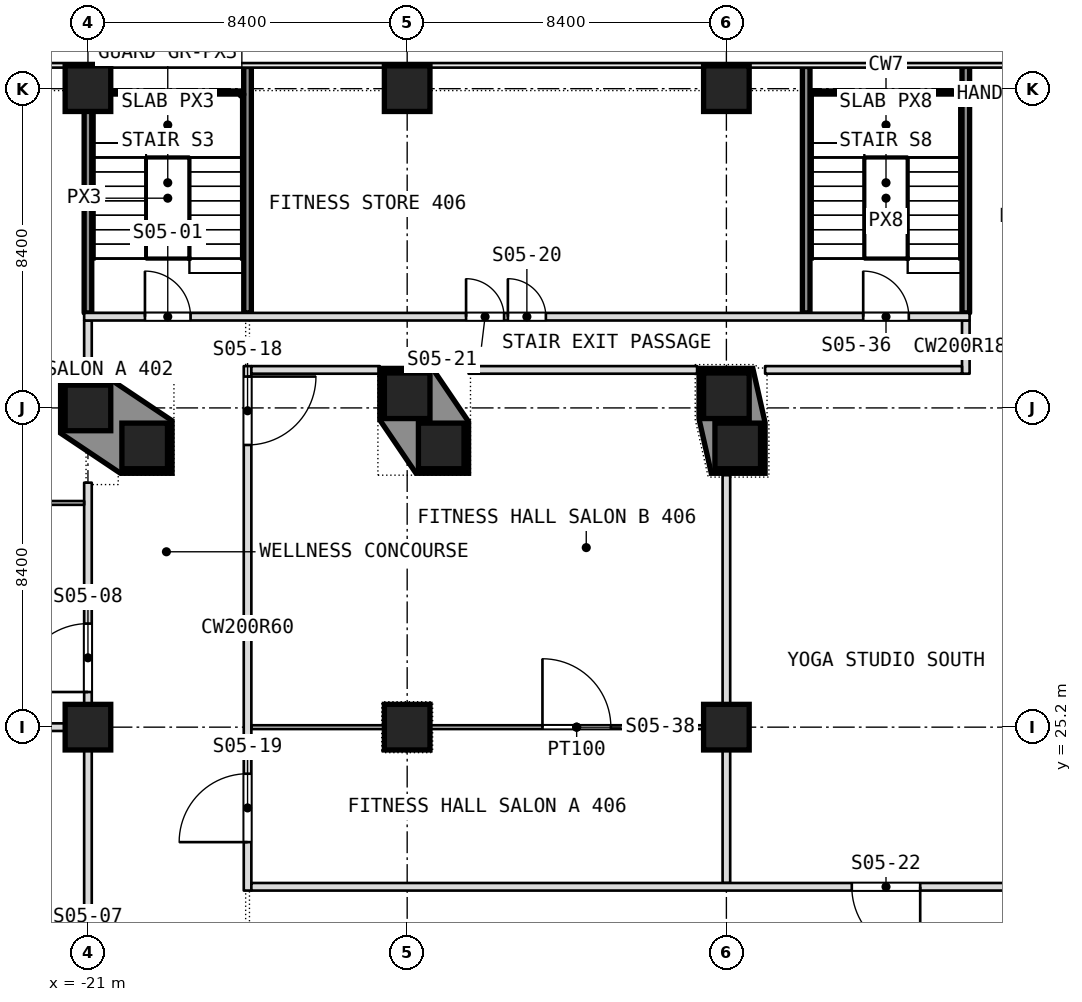
"""IFC4 building model, lengths in metres.
Left out: names, types, materials, properties, quantities, classifications, styles, units other than length and angle.
Written with IfcOpenShell. Run it as: python <this file> out.ifc"""

import sys

from ifc_helpers import new_model, si_unit, direction, frame, frame_2d, origin, origin_2d, place, context, subcontext, project, spatial, polyline, rectangle, outline, extrude, element, fill, save


model = new_model("IFC4")
c1 = context("Model", 3, precision=1e-05, world=origin(), true_north=direction((0.0, 1.0)))
c2 = subcontext(c1, "Body", "Model", "MODEL_VIEW")
j1 = project(units=[si_unit("LENGTHUNIT", "METRE"), si_unit("PLANEANGLEUNIT", "RADIAN")], contexts=[c1])
p1 = place(None, origin())
s1 = spatial("IfcSite", under=j1, at=p1, CompositionType="ELEMENT")
p2 = place(p1, origin())
s2 = spatial("IfcBuilding", under=s1, at=p2, CompositionType="ELEMENT")
p3 = place(p2, frame((0.0, 0.0, 26.0)))
s3 = spatial("IfcBuildingStorey", under=s2, at=p3, CompositionType="ELEMENT", Elevation=26.0)
for number, where, z_axis, x_axis in (
    (1, (-21.0, 25.2, 0.0), (0.0, 0.0, 1.0), (1.0, 0.0, 0.0)),
    (2, (-12.6, 25.2, 0.0), (0.0, 0.0, 1.0), (1.0, 0.0, 0.0)),
    (3, (-4.2, 25.2, 0.0), (0.0, 0.0, 1.0), (1.0, 0.0, 0.0)),
    (4, (-21.0, 33.6, 0.0), (0.0, 0.0, 1.0), (1.0, 0.0, 0.0)),
    (5, (-12.6, 33.92, 0.0), (0.0, 0.0, 1.0), (1.0, 0.0, 0.0)),
    (6, (-4.2, 33.92, 0.0), (0.0, 0.0, 1.0), (1.0, 0.0, 0.0)),
    (7, (-21.0, 42.0, 0.0), (0.0, 0.0, 1.0), (1.0, 0.0, 0.0)),
    (8, (-12.6, 42.0, 0.0), (0.0, 0.0, 1.0), (1.0, 0.0, 0.0)),
    (9, (-4.2, 42.0, 0.0), (0.0, 0.0, 1.0), (1.0, 0.0, 0.0)),
    (10, (-19.507, 32.6, 0.0), (0.0, 0.0, 1.0), (1.0, 0.0, 0.0)),
    (11, (-11.704, 32.6, 0.0), (0.0, 0.0, 1.0), (1.0, 0.0, 0.0)),
    (12, (-3.901, 32.6, 0.0), (0.0, 0.0, 1.0), (1.0, 0.0, 0.0)),
):
    element("IfcColumn", number, at=place(p3, frame(where, z_axis=z_axis, x_axis=x_axis)), inside=s3, PredefinedType="COLUMN", context=c2, shape_type="SweptSolid", body=[
        extrude(rectangle(XDim=1.2, YDim=1.2, at=origin_2d()), origin(), (0.0, 0.0, 1.0), 5.0),
    ])
p4 = place(p3, frame((2.1, 36.1, 0.0), z_axis=(0.0, 0.0, 1.0), x_axis=(0.0, 1.0, 0.0)))
e13 = element("IfcWall", 13, at=p4, inside=s3, PredefinedType="PARTITIONING", context=c2, shape_type="SweptSolid", body=[
    extrude(rectangle(XDim=6.484, YDim=0.2, at=frame_2d((3.242, 0.0))), origin(), (0.0, 0.0, 1.0), 4.68),
])
p5 = place(p3, frame((2.1, 34.5, 0.0), z_axis=(0.0, 0.0, 1.0), x_axis=(0.0, 1.0, 0.0)))
e14 = element("IfcWall", 14, at=p5, inside=s3, PredefinedType="PARTITIONING", context=c2, shape_type="SweptSolid", body=[
    extrude(rectangle(XDim=1.4, YDim=0.2, at=frame_2d((0.7, 0.0))), origin(), (0.0, 0.0, 1.0), 4.68),
])
p6 = place(p3, frame((-2.1, 36.1, 0.0), z_axis=(0.0, 0.0, 1.0), x_axis=(0.0, 1.0, 0.0)))
e15 = element("IfcWall", 15, at=p6, inside=s3, PredefinedType="PARTITIONING", context=c2, shape_type="SweptSolid", body=[
    extrude(rectangle(XDim=6.484, YDim=0.2, at=frame_2d((3.242, 0.0))), origin(), (0.0, 0.0, 1.0), 4.68),
])
p7 = place(p3, frame((-4.2, 21.1, 0.0), z_axis=(0.0, 0.0, 1.0), x_axis=(0.0, 1.0, 0.0)))
e16 = element("IfcWall", 16, at=p7, inside=s3, PredefinedType="PARTITIONING", context=c2, shape_type="SweptSolid", body=[
    extrude(rectangle(XDim=10.73, YDim=0.2, at=frame_2d((5.365, 0.0))), origin(), (0.0, 0.0, 1.0), 4.68),
])
p8 = place(p3, frame((-16.8, 20.9, 0.0), z_axis=(0.0, 0.0, 1.0), x_axis=(0.0, 1.0, 0.0)))
e17 = element("IfcWall", 17, at=p8, inside=s3, PredefinedType="PARTITIONING", context=c2, shape_type="SweptSolid", body=[
    extrude(rectangle(XDim=13.8, YDim=0.2, at=frame_2d((6.9, 0.0))), origin(), (0.0, 0.0, 1.0), 4.68),
])
p9 = place(p8, frame((11.725, 0.0, 0.0)))
e18 = element("IfcOpeningElement", 18, at=p9, cuts=e17, PredefinedType="OPENING", context=c2, shape_type="SweptSolid", body=[
    extrude(rectangle(XDim=1.8, YDim=2.1, at=frame_2d((0.9, 1.05))), frame((0.0, 0.1, 0.0), z_axis=(0.0, -1.0, 0.0), x_axis=(1.0, 0.0, 0.0)), (0.0, 0.0, 1.0), 0.2),
])
p10 = place(p8, frame((1.275, 0.0, 0.0)))
e19 = element("IfcOpeningElement", 19, at=p10, cuts=e17, PredefinedType="OPENING", context=c2, shape_type="SweptSolid", body=[
    extrude(rectangle(XDim=1.8, YDim=2.1, at=frame_2d((0.9, 1.05))), frame((0.0, 0.1, 0.0), z_axis=(0.0, -1.0, 0.0), x_axis=(1.0, 0.0, 0.0)), (0.0, 0.0, 1.0), 0.2),
])
p11 = place(p3, frame((-16.8, 36.1, 0.0), z_axis=(0.0, 0.0, 1.0), x_axis=(0.0, 1.0, 0.0)))
e20 = element("IfcWall", 20, at=p11, inside=s3, PredefinedType="PARTITIONING", context=c2, shape_type="SweptSolid", body=[
    extrude(rectangle(XDim=6.484, YDim=0.2, at=frame_2d((3.242, 0.0))), origin(), (0.0, 0.0, 1.0), 4.68),
])
p12 = place(p3, frame((-21.0, 9.5, 0.0), z_axis=(0.0, 0.0, 1.0), x_axis=(0.0, 1.0, 0.0)))
e21 = element("IfcWall", 21, at=p12, inside=s3, PredefinedType="PARTITIONING", context=c2, shape_type="SweptSolid", body=[
    extrude(rectangle(XDim=22.133, YDim=0.2, at=frame_2d((11.066, 0.0))), origin(), (0.0, 0.0, 1.0), 4.68),
])
p13 = place(p12, frame((8.2, 0.0, 0.0)))
e22 = element("IfcOpeningElement", 22, at=p13, cuts=e21, PredefinedType="OPENING", context=c2, shape_type="SweptSolid", body=[
    extrude(rectangle(XDim=1.8, YDim=2.1, at=frame_2d((0.9, 1.05))), frame((0.0, 0.1, 0.0), z_axis=(0.0, -1.0, 0.0), x_axis=(1.0, 0.0, 0.0)), (0.0, 0.0, 1.0), 0.2),
])
p14 = place(p12, frame((16.625, 0.0, 0.0)))
e23 = element("IfcOpeningElement", 23, at=p14, cuts=e21, PredefinedType="OPENING", context=c2, shape_type="SweptSolid", body=[
    extrude(rectangle(XDim=1.8, YDim=2.1, at=frame_2d((0.9, 1.05))), frame((0.0, 0.1, 0.0), z_axis=(0.0, -1.0, 0.0), x_axis=(1.0, 0.0, 0.0)), (0.0, 0.0, 1.0), 0.2),
])
p15 = place(p3, frame((-21.0, 34.567, 0.0), z_axis=(0.0, 0.0, 1.0), x_axis=(0.0, 1.0, 0.0)))
e24 = element("IfcWall", 24, at=p15, inside=s3, PredefinedType="PARTITIONING", context=c2, shape_type="SweptSolid", body=[
    extrude(rectangle(XDim=1.333, YDim=0.2, at=frame_2d((0.667, 0.0))), origin(), (0.0, 0.0, 1.0), 4.68),
])
p16 = place(p3, frame((-21.0, 36.1, 0.0), z_axis=(0.0, 0.0, 1.0), x_axis=(0.0, 1.0, 0.0)))
e25 = element("IfcWall", 25, at=p16, inside=s3, PredefinedType="PARTITIONING", context=c2, shape_type="SweptSolid", body=[
    extrude(rectangle(XDim=6.484, YDim=0.2, at=frame_2d((3.242, 0.0))), origin(), (0.0, 0.0, 1.0), 4.68),
])
p17 = place(p3, frame((-16.7, 21.0, 0.0), z_axis=(0.0, 0.0, 1.0), x_axis=(1.0, 0.0, 0.0)))
e26 = element("IfcWall", 26, at=p17, inside=s3, PredefinedType="PARTITIONING", context=c2, shape_type="SweptSolid", body=[
    extrude(rectangle(XDim=33.4, YDim=0.2, at=frame_2d((16.7, 0.0))), origin(), (0.0, 0.0, 1.0), 4.68),
])
p18 = place(p17, frame((15.8, 0.0, 0.0)))
e27 = element("IfcOpeningElement", 27, at=p18, cuts=e26, PredefinedType="OPENING", context=c2, shape_type="SweptSolid", body=[
    extrude(rectangle(XDim=1.8, YDim=2.1, at=frame_2d((0.9, 1.05))), frame((0.0, 0.1, 0.0), z_axis=(0.0, -1.0, 0.0), x_axis=(1.0, 0.0, 0.0)), (0.0, 0.0, 1.0), 0.2),
])
p19 = place(p17, frame((26.6, 0.0, 0.0)))
e28 = element("IfcOpeningElement", 28, at=p19, cuts=e26, PredefinedType="OPENING", context=c2, shape_type="SweptSolid", body=[
    extrude(rectangle(XDim=1.0, YDim=2.1, at=frame_2d((0.5, 1.05))), frame((0.0, 0.1, 0.0), z_axis=(0.0, -1.0, 0.0), x_axis=(1.0, 0.0, 0.0)), (0.0, 0.0, 1.0), 0.2),
])
p20 = place(p3, frame((-27.865, 25.2, 0.0), z_axis=(0.0, 0.0, 1.0), x_axis=(1.0, 0.0, 0.0)))
e29 = element("IfcWall", 29, at=p20, inside=s3, PredefinedType="PARTITIONING", context=c2, shape_type="SweptSolid", body=[
    extrude(rectangle(XDim=6.765, YDim=0.2, at=frame_2d((3.382, 0.0))), origin(), (0.0, 0.0, 1.0), 4.68),
])
p21 = place(p3, frame((-16.7, 25.2, 0.0), z_axis=(0.0, 0.0, 1.0), x_axis=(1.0, 0.0, 0.0)))
e30 = element("IfcWall", 30, at=p21, inside=s3, PredefinedType="PARTITIONING", context=c2, shape_type="SweptSolid", body=[
    extrude(rectangle(XDim=3.48, YDim=0.1, at=frame_2d((1.74, 0.0))), origin(), (0.0, 0.0, 1.0), 4.68),
])
p22 = place(p3, frame((-11.98, 25.2, 0.0), z_axis=(0.0, 0.0, 1.0), x_axis=(1.0, 0.0, 0.0)))
e31 = element("IfcWall", 31, at=p22, inside=s3, PredefinedType="PARTITIONING", context=c2, shape_type="SweptSolid", body=[
    extrude(rectangle(XDim=7.68, YDim=0.1, at=frame_2d((3.84, 0.0))), origin(), (0.0, 0.0, 1.0), 4.68),
])
p23 = place(p22, frame((2.94, 0.0, 0.0)))
e32 = element("IfcOpeningElement", 32, at=p23, cuts=e31, PredefinedType="OPENING", context=c2, shape_type="SweptSolid", body=[
    extrude(rectangle(XDim=1.8, YDim=2.1, at=frame_2d((0.9, 1.05))), frame((0.0, 0.05, 0.0), z_axis=(0.0, -1.0, 0.0), x_axis=(1.0, 0.0, 0.0)), (0.0, 0.0, 1.0), 0.1),
])
p24 = place(p3, frame((-25.916, 31.1, 0.0), z_axis=(0.0, 0.0, 1.0), x_axis=(1.0, 0.0, 0.0)))
e33 = element("IfcWall", 33, at=p24, inside=s3, PredefinedType="PARTITIONING", context=c2, shape_type="SweptSolid", body=[
    extrude(rectangle(XDim=4.816, YDim=0.1, at=frame_2d((2.408, 0.0))), origin(), (0.0, 0.0, 1.0), 4.68),
])
p25 = place(p24, frame((0.308, 0.0, 0.0)))
e34 = element("IfcOpeningElement", 34, at=p25, cuts=e33, PredefinedType="OPENING", context=c2, shape_type="SweptSolid", body=[
    extrude(rectangle(XDim=1.8, YDim=2.1, at=frame_2d((0.9, 1.05))), frame((0.0, 0.05, 0.0), z_axis=(0.0, -1.0, 0.0), x_axis=(1.0, 0.0, 0.0)), (0.0, 0.0, 1.0), 0.1),
])
p26 = place(p3, frame((-16.7, 34.6, 0.0), z_axis=(0.0, 0.0, 1.0), x_axis=(1.0, 0.0, 0.0)))
e35 = element("IfcWall", 35, at=p26, inside=s3, PredefinedType="PARTITIONING", context=c2, shape_type="SweptSolid", body=[
    extrude(rectangle(XDim=3.38, YDim=0.2, at=frame_2d((1.69, 0.0))), origin(), (0.0, 0.0, 1.0), 4.68),
])
p27 = place(p3, frame((-10.984, 34.6, 0.0), z_axis=(0.0, 0.0, 1.0), x_axis=(1.0, 0.0, 0.0)))
e36 = element("IfcWall", 36, at=p27, inside=s3, PredefinedType="PARTITIONING", context=c2, shape_type="SweptSolid", body=[
    extrude(rectangle(XDim=6.014, YDim=0.2, at=frame_2d((3.007, 0.0))), origin(), (0.0, 0.0, 1.0), 4.68),
])
p28 = place(p3, frame((-3.181, 34.6, 0.0), z_axis=(0.0, 0.0, 1.0), x_axis=(1.0, 0.0, 0.0)))
e37 = element("IfcWall", 37, at=p28, inside=s3, PredefinedType="PARTITIONING", context=c2, shape_type="SweptSolid", body=[
    extrude(rectangle(XDim=5.181, YDim=0.2, at=frame_2d((2.59, 0.0))), origin(), (0.0, 0.0, 1.0), 4.68),
])
p29 = place(p3, frame((-21.1, 36.0, 0.0), z_axis=(0.0, 0.0, 1.0), x_axis=(1.0, 0.0, 0.0)))
e38 = element("IfcWall", 38, at=p29, inside=s3, PredefinedType="PARTITIONING", context=c2, shape_type="SweptSolid", body=[
    extrude(rectangle(XDim=23.3, YDim=0.2, at=frame_2d((11.65, 0.0))), origin(), (0.0, 0.0, 1.0), 4.68),
])
p30 = place(p29, frame((1.6, 0.0, 0.0)))
e39 = element("IfcOpeningElement", 39, at=p30, cuts=e38, PredefinedType="OPENING", context=c2, shape_type="SweptSolid", body=[
    extrude(rectangle(XDim=1.2, YDim=2.1, at=frame_2d((0.6, 1.05))), frame((0.0, 0.1, 0.0), z_axis=(0.0, -1.0, 0.0), x_axis=(1.0, 0.0, 0.0)), (0.0, 0.0, 1.0), 0.2),
])
p31 = place(p29, frame((11.15, 0.0, 0.0)))
e40 = element("IfcOpeningElement", 40, at=p31, cuts=e38, PredefinedType="OPENING", context=c2, shape_type="SweptSolid", body=[
    extrude(rectangle(XDim=1.0, YDim=2.1, at=frame_2d((0.5, 1.05))), frame((0.0, 0.1, 0.0), z_axis=(0.0, -1.0, 0.0), x_axis=(1.0, 0.0, 0.0)), (0.0, 0.0, 1.0), 0.2),
])
p32 = place(p29, frame((10.05, 0.0, 0.0)))
e41 = element("IfcOpeningElement", 41, at=p32, cuts=e38, PredefinedType="OPENING", context=c2, shape_type="SweptSolid", body=[
    extrude(rectangle(XDim=1.0, YDim=2.1, at=frame_2d((0.5, 1.05))), frame((0.0, 0.1, 0.0), z_axis=(0.0, -1.0, 0.0), x_axis=(1.0, 0.0, 0.0)), (0.0, 0.0, 1.0), 0.2),
])
p33 = place(p29, frame((20.5, 0.0, 0.0)))
e42 = element("IfcOpeningElement", 42, at=p33, cuts=e38, PredefinedType="OPENING", context=c2, shape_type="SweptSolid", body=[
    extrude(rectangle(XDim=1.2, YDim=2.1, at=frame_2d((0.6, 1.05))), frame((0.0, 0.1, 0.0), z_axis=(0.0, -1.0, 0.0), x_axis=(1.0, 0.0, 0.0)), (0.0, 0.0, 1.0), 0.2),
])
p34 = place(p3, origin())
e43 = element("IfcWall", 43, at=p34, inside=s3, PredefinedType="SOLIDWALL", context=c2, shape_type="SweptSolid", body=[
    extrude(outline(polyline([(-21.72, 34.32), (-20.364, 34.32), (-18.787, 33.264), (-18.787, 31.88), (-20.143, 31.88), (-21.72, 32.936), (-21.72, 34.32)]), holes=[polyline([(-18.907, 32.0), (-18.907, 33.2), (-20.107, 33.2), (-20.107, 32.0), (-18.907, 32.0)]), polyline([(-20.4, 33.0), (-20.4, 34.2), (-21.6, 34.2), (-21.6, 33.0), (-20.4, 33.0)])]), origin(), (0.0, 0.0, 1.0), 5.0),
])
p35 = place(p3, origin())
e44 = element("IfcWall", 44, at=p35, inside=s3, PredefinedType="SOLIDWALL", context=c2, shape_type="SweptSolid", body=[
    extrude(outline(polyline([(-13.32, 34.64), (-11.937, 34.64), (-10.984, 33.237), (-10.984, 31.88), (-12.368, 31.88), (-13.32, 33.283), (-13.32, 34.64)]), holes=[polyline([(-11.104, 32.0), (-11.104, 33.2), (-12.304, 33.2), (-12.304, 32.0), (-11.104, 32.0)]), polyline([(-12.0, 33.32), (-12.0, 34.52), (-13.2, 34.52), (-13.2, 33.32), (-12.0, 33.32)])]), origin(), (0.0, 0.0, 1.0), 5.0),
])
p36 = place(p3, origin())
e45 = element("IfcWall", 45, at=p36, inside=s3, PredefinedType="SOLIDWALL", context=c2, shape_type="SweptSolid", body=[
    extrude(outline(polyline([(-4.92, 33.307), (-4.92, 34.64), (-3.504, 34.64), (-3.181, 33.213), (-3.181, 31.88), (-4.597, 31.88), (-4.92, 33.307)]), holes=[polyline([(-4.501, 32.0), (-3.302, 32.0), (-3.302, 33.2), (-4.501, 33.2), (-4.501, 32.0)]), polyline([(-4.8, 33.32), (-3.6, 33.32), (-3.6, 34.52), (-4.8, 34.52), (-4.8, 33.32)])]), origin(), (0.0, 0.0, 1.0), 5.0),
])
p37 = place(p30, origin())
e46 = element("IfcDoor", 46, at=p37, inside=s3, OperationType="SINGLE_SWING_RIGHT", PredefinedType="DOOR", context=c2, shape_type="SweptSolid", body=[
    extrude(rectangle(XDim=1.2, YDim=2.1, at=frame_2d((0.6, 1.05))), frame((0.0, 0.025, 0.0), z_axis=(0.0, -1.0, 0.0), x_axis=(1.0, 0.0, 0.0)), (0.0, 0.0, 1.0), 0.05),
])
fill(e39, e46)
p38 = place(p14, origin())
e47 = element("IfcDoor", 47, at=p38, inside=s3, OperationType="DOUBLE_DOOR_SINGLE_SWING", PredefinedType="DOOR", context=c2, shape_type="SweptSolid", body=[
    extrude(rectangle(XDim=1.8, YDim=2.1, at=frame_2d((0.9, 1.05))), frame((0.0, 0.025, 0.0), z_axis=(0.0, -1.0, 0.0), x_axis=(1.0, 0.0, 0.0)), (0.0, 0.0, 1.0), 0.05),
])
fill(e23, e47)
p39 = place(p9, origin())
e48 = element("IfcDoor", 48, at=p39, inside=s3, OperationType="DOUBLE_DOOR_SINGLE_SWING", PredefinedType="DOOR", context=c2, shape_type="SweptSolid", body=[
    extrude(rectangle(XDim=1.8, YDim=2.1, at=frame_2d((0.9, 1.05))), frame((0.0, 0.025, 0.0), z_axis=(0.0, -1.0, 0.0), x_axis=(1.0, 0.0, 0.0)), (0.0, 0.0, 1.0), 0.05),
])
fill(e18, e48)
p40 = place(p10, origin())
e49 = element("IfcDoor", 49, at=p40, inside=s3, OperationType="DOUBLE_DOOR_SINGLE_SWING", PredefinedType="DOOR", context=c2, shape_type="SweptSolid", body=[
    extrude(rectangle(XDim=1.8, YDim=2.1, at=frame_2d((0.9, 1.05))), frame((0.0, 0.025, 0.0), z_axis=(0.0, -1.0, 0.0), x_axis=(1.0, 0.0, 0.0)), (0.0, 0.0, 1.0), 0.05),
])
fill(e19, e49)
p41 = place(p31, origin())
e50 = element("IfcDoor", 50, at=p41, inside=s3, OperationType="SINGLE_SWING_LEFT", PredefinedType="DOOR", context=c2, shape_type="SweptSolid", body=[
    extrude(rectangle(XDim=1.0, YDim=2.1, at=frame_2d((0.5, 1.05))), frame((0.0, 0.025, 0.0), z_axis=(0.0, -1.0, 0.0), x_axis=(1.0, 0.0, 0.0)), (0.0, 0.0, 1.0), 0.05),
])
fill(e40, e50)
p42 = place(p32, origin())
e51 = element("IfcDoor", 51, at=p42, inside=s3, OperationType="SINGLE_SWING_LEFT", PredefinedType="DOOR", context=c2, shape_type="SweptSolid", body=[
    extrude(rectangle(XDim=1.0, YDim=2.1, at=frame_2d((0.5, 1.05))), frame((0.0, 0.025, 0.0), z_axis=(0.0, -1.0, 0.0), x_axis=(1.0, 0.0, 0.0)), (0.0, 0.0, 1.0), 0.05),
])
fill(e41, e51)
p43 = place(p18, origin())
e52 = element("IfcDoor", 52, at=p43, inside=s3, OperationType="DOUBLE_DOOR_SINGLE_SWING", PredefinedType="DOOR", context=c2, shape_type="SweptSolid", body=[
    extrude(rectangle(XDim=1.8, YDim=2.1, at=frame_2d((0.9, 1.05))), frame((0.0, 0.025, 0.0), z_axis=(0.0, -1.0, 0.0), x_axis=(1.0, 0.0, 0.0)), (0.0, 0.0, 1.0), 0.05),
])
fill(e27, e52)
p44 = place(p33, origin())
e53 = element("IfcDoor", 53, at=p44, inside=s3, OperationType="SINGLE_SWING_RIGHT", PredefinedType="DOOR", context=c2, shape_type="SweptSolid", body=[
    extrude(rectangle(XDim=1.2, YDim=2.1, at=frame_2d((0.6, 1.05))), frame((0.0, 0.025, 0.0), z_axis=(0.0, -1.0, 0.0), x_axis=(1.0, 0.0, 0.0)), (0.0, 0.0, 1.0), 0.05),
])
fill(e42, e53)
p45 = place(p23, origin())
e54 = element("IfcDoor", 54, at=p45, inside=s3, OperationType="DOUBLE_DOOR_SINGLE_SWING", PredefinedType="DOOR", context=c2, shape_type="SweptSolid", body=[
    extrude(rectangle(XDim=1.8, YDim=2.1, at=frame_2d((0.9, 1.05))), frame((0.0, 0.025, 0.0), z_axis=(0.0, -1.0, 0.0), x_axis=(1.0, 0.0, 0.0)), (0.0, 0.0, 1.0), 0.05),
])
fill(e32, e54)
save(model, sys.argv[1])
